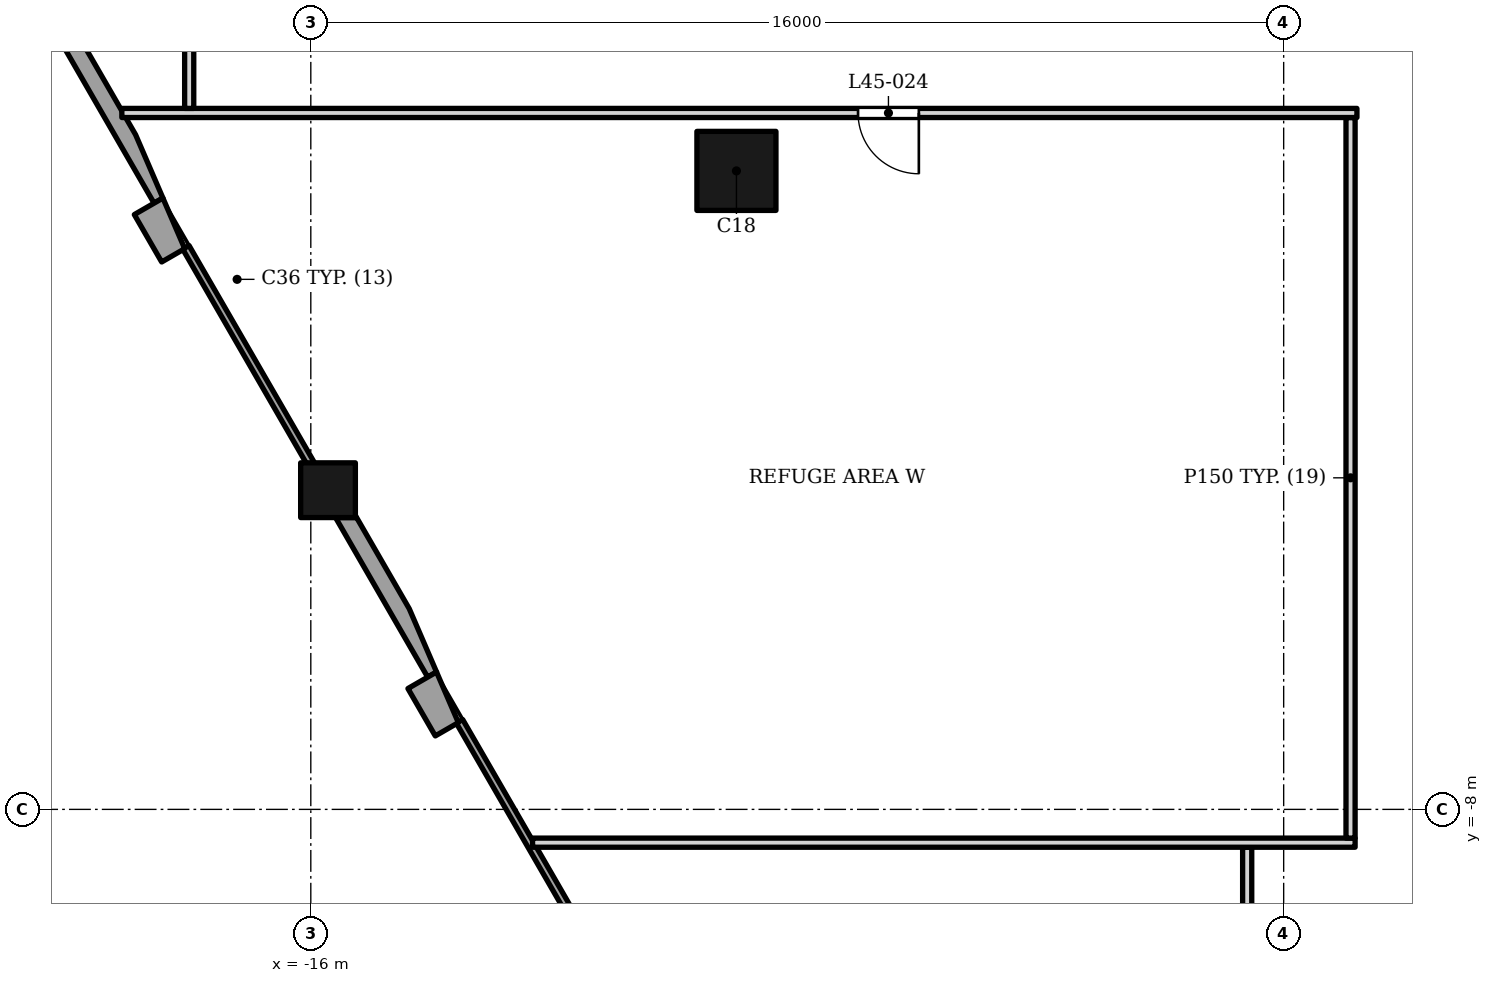
"""IFC4 building model, lengths in metres.
Left out: names, types, materials, properties, quantities, classifications, styles, units other than length and angle.
Written with IfcOpenShell. Run it as: python <this file> out.ifc"""

import sys

from ifc_helpers import new_model, si_unit, direction, frame, frame_2d, origin, origin_2d, place, context, subcontext, project, spatial, polyline, rectangle, outline, extrude, clip, halfspace, element, fill, save


model = new_model("IFC4")
c1 = context("Model", 3, precision=1e-05, world=origin(), true_north=direction((0.0, 1.0)))
c2 = subcontext(c1, "Body", "Model", "MODEL_VIEW")
j1 = project(units=[si_unit("LENGTHUNIT", "METRE"), si_unit("PLANEANGLEUNIT", "RADIAN")], contexts=[c1])
p1 = place(None, origin())
s1 = spatial("IfcSite", under=j1, at=p1, CompositionType="ELEMENT")
p2 = place(p1, origin())
s2 = spatial("IfcBuilding", under=s1, at=p2, CompositionType="ELEMENT")
p3 = place(p2, frame((0.0, 0.0, 191.4)))
s3 = spatial("IfcBuildingStorey", under=s2, at=p3, CompositionType="ELEMENT", Elevation=191.4)
p4 = place(p3, frame((-9.0, 2.5, 0.0), z_axis=(0.0, 0.0, 1.0), x_axis=(1.0, 0.0, 0.0)))
e1 = element("IfcColumn", 1, at=p4, inside=s3, PredefinedType="COLUMN", context=c2, shape_type="SweptSolid", body=[
    extrude(rectangle(XDim=1.3, YDim=1.3, at=origin_2d()), origin(), (0.0, 0.0, 1.0), 5.0),
])
p5 = place(p3, frame((-15.717, -2.751, 0.0), z_axis=(-0.33011858032, 0.765685342742, 0.552039562746), x_axis=(-0.918288424584, -0.395912072656, 0.0)))
e2 = element("IfcColumn", 2, at=p5, inside=s3, PredefinedType="COLUMN", context=c2, shape_type="Clipping", body=[
    clip(clip(extrude(rectangle(XDim=0.9, YDim=0.9, at=origin_2d()), origin(), (0.0, 0.0, 1.0), 9.057), halfspace(frame((0.0, 0.0, 0.687), z_axis=(0.0, 0.0, 1.0), x_axis=(1.0, 0.0, 0.0)), True)), halfspace(frame((0.0, 0.0, 8.37), z_axis=(0.0, 0.0, 1.0), x_axis=(1.0, 0.0, 0.0)), False)),
])
p6 = place(p3, frame((-11.217, -10.543, 0.0), z_axis=(-0.330179907821, 0.765584946712, 0.55214211743), x_axis=(-0.918242801662, -0.396017874844, 0.0)))
e3 = element("IfcColumn", 3, at=p6, inside=s3, PredefinedType="COLUMN", context=c2, shape_type="Clipping", body=[
    clip(clip(extrude(rectangle(XDim=0.9, YDim=0.9, at=origin_2d()), origin(), (0.0, 0.0, 1.0), 9.056), halfspace(frame((0.0, 0.0, 0.687), z_axis=(0.0, 0.0, 1.0), x_axis=(1.0, 0.0, 0.0)), True)), halfspace(frame((0.0, 0.0, 8.369), z_axis=(0.0, 0.0, 1.0), x_axis=(1.0, 0.0, 0.0)), False)),
])
p7 = place(p3, origin())
e4 = element("IfcWall", 4, at=p7, inside=s3, PredefinedType="SOLIDWALL", context=c2, shape_type="SweptSolid", body=[
    extrude(outline(polyline([(-18.903, 1.782), (-18.453, 1.002), (-18.073, 1.221), (-18.432, 2.053), (-18.903, 1.782)])), origin(), (0.0, 0.0, 1.0), 3.5),
])
p8 = place(p3, origin())
e5 = element("IfcWall", 5, at=p8, inside=s3, PredefinedType="SOLIDWALL", context=c2, shape_type="SweptSolid", body=[
    extrude(outline(polyline([(-14.403, -6.013), (-13.953, -6.792), (-13.573, -6.573), (-13.932, -5.741), (-14.403, -6.013)])), origin(), (0.0, 0.0, 1.0), 3.5),
])
p9 = place(p3, origin())
e6 = element("IfcWall", 6, at=p9, inside=s3, PredefinedType="ELEMENTEDWALL", context=c2, shape_type="SweptSolid", body=[
    extrude(outline(polyline([(-18.578, 1.969), (-18.432, 2.053), (-18.882, 3.095), (-19.874, 4.814), (-20.22, 4.814), (-18.578, 1.969)])), origin(), (0.0, 0.0, 1.0), 3.5),
])
p10 = place(p3, origin())
e7 = element("IfcWall", 7, at=p10, inside=s3, PredefinedType="ELEMENTEDWALL", context=c2, shape_type="SweptSolid", body=[
    extrude(outline(polyline([(-14.078, -5.825), (-13.932, -5.741), (-14.381, -4.7), (-15.267, -3.166), (-15.267, -3.201), (-15.593, -3.201), (-14.078, -5.825)])), origin(), (0.0, 0.0, 1.0), 3.5),
])
p11 = place(p3, frame((-18.055, 1.243, 0.0), z_axis=(0.0, 0.0, 1.0), x_axis=(0.499990325971, -0.866030989016, 0.0)))
e8 = element("IfcWall", 8, at=p11, inside=s3, PredefinedType="SOLIDWALL", context=c2, shape_type="SweptSolid", body=[
    extrude(rectangle(XDim=4.234, YDim=0.12, at=frame_2d((2.117, 0.0))), origin(), (0.0, 0.0, 1.0), 3.5),
])
p12 = place(p3, frame((-11.439, -10.216, 0.0), z_axis=(0.0, 0.0, 1.0), x_axis=(-0.499992114976, 0.866029956157, 0.0)))
e9 = element("IfcWall", 9, at=p12, inside=s3, PredefinedType="SOLIDWALL", context=c2, shape_type="SweptSolid", body=[
    extrude(rectangle(XDim=4.232, YDim=0.12, at=frame_2d((2.116, 0.0))), origin(), (0.0, 0.0, 1.0), 3.5),
])
p13 = place(p3, frame((-0.6, -11.33, 0.0), z_axis=(0.0, 0.0, 1.0), x_axis=(0.0, 1.0, 0.0)))
e10 = element("IfcWall", 10, at=p13, inside=s3, PredefinedType="PARTITIONING", context=c2, shape_type="SweptSolid", body=[
    extrude(rectangle(XDim=2.708, YDim=0.15, at=frame_2d((1.354, 0.0))), origin(), (0.0, 0.0, 1.0), 4.83),
])
p14 = place(p3, frame((-12.353, -8.547, 0.0), z_axis=(0.0, 0.0, 1.0), x_axis=(1.0, 0.0, 0.0)))
e11 = element("IfcWall", 11, at=p14, inside=s3, PredefinedType="PARTITIONING", context=c2, shape_type="SweptSolid", body=[
    extrude(rectangle(XDim=13.528, YDim=0.15, at=frame_2d((6.764, 0.0))), origin(), (0.0, 0.0, 1.0), 3.984),
])
p15 = place(p3, frame((1.1, -8.472, 0.0), z_axis=(0.0, 0.0, 1.0), x_axis=(0.0, 1.0, 0.0)))
e12 = element("IfcWall", 12, at=p15, inside=s3, PredefinedType="PARTITIONING", context=c2, shape_type="SweptSolid", body=[
    extrude(rectangle(XDim=11.85, YDim=0.15, at=frame_2d((5.925, 0.0))), origin(), (0.0, 0.0, 1.0), 4.83),
])
p16 = place(p3, frame((-19.108, 3.453, 0.0), z_axis=(0.0, 0.0, 1.0), x_axis=(1.0, 0.0, 0.0)))
e13 = element("IfcWall", 13, at=p16, inside=s3, PredefinedType="PARTITIONING", context=c2, shape_type="SweptSolid", body=[
    extrude(rectangle(XDim=20.313, YDim=0.15, at=frame_2d((10.156, 0.0))), origin(), (0.0, 0.0, 1.0), 3.752),
])
p17 = place(p16, frame((12.108, 0.0, 0.0)))
e14 = element("IfcOpeningElement", 14, at=p17, cuts=e13, PredefinedType="OPENING", context=c2, shape_type="SweptSolid", body=[
    extrude(rectangle(XDim=1.0, YDim=2.1, at=frame_2d((0.5, 1.05))), frame((0.0, 0.085, 0.0), z_axis=(0.0, -1.0, 0.0), x_axis=(1.0, 0.0, 0.0)), (0.0, 0.0, 1.0), 0.17),
])
p18 = place(p3, frame((-18.0, 3.528, 0.0), z_axis=(0.0, 0.0, 1.0), x_axis=(0.0, 1.0, 0.0)))
e15 = element("IfcWall", 15, at=p18, inside=s3, PredefinedType="PARTITIONING", context=c2, shape_type="SweptSolid", body=[
    extrude(rectangle(XDim=9.363, YDim=0.15, at=frame_2d((4.682, 0.0))), origin(), (0.0, 0.0, 1.0), 3.752),
])
p19 = place(p18, frame((4.275, 0.0, 0.0)))
e16 = element("IfcOpeningElement", 16, at=p19, cuts=e15, PredefinedType="OPENING", context=c2, shape_type="SweptSolid", body=[
    extrude(rectangle(XDim=1.0, YDim=2.1, at=frame_2d((0.5, 1.05))), frame((0.0, 0.085, 0.0), z_axis=(0.0, -1.0, 0.0), x_axis=(1.0, 0.0, 0.0)), (0.0, 0.0, 1.0), 0.17),
])
p20 = place(p17, origin())
e17 = element("IfcDoor", 17, at=p20, inside=s3, OperationType="SINGLE_SWING_RIGHT", PredefinedType="DOOR", context=c2, shape_type="SweptSolid", body=[
    extrude(rectangle(XDim=1.0, YDim=2.1, at=frame_2d((0.5, 1.05))), frame((0.0, 0.025, 0.0), z_axis=(0.0, -1.0, 0.0), x_axis=(1.0, 0.0, 0.0)), (0.0, 0.0, 1.0), 0.05),
])
fill(e14, e17)
save(model, sys.argv[1])
